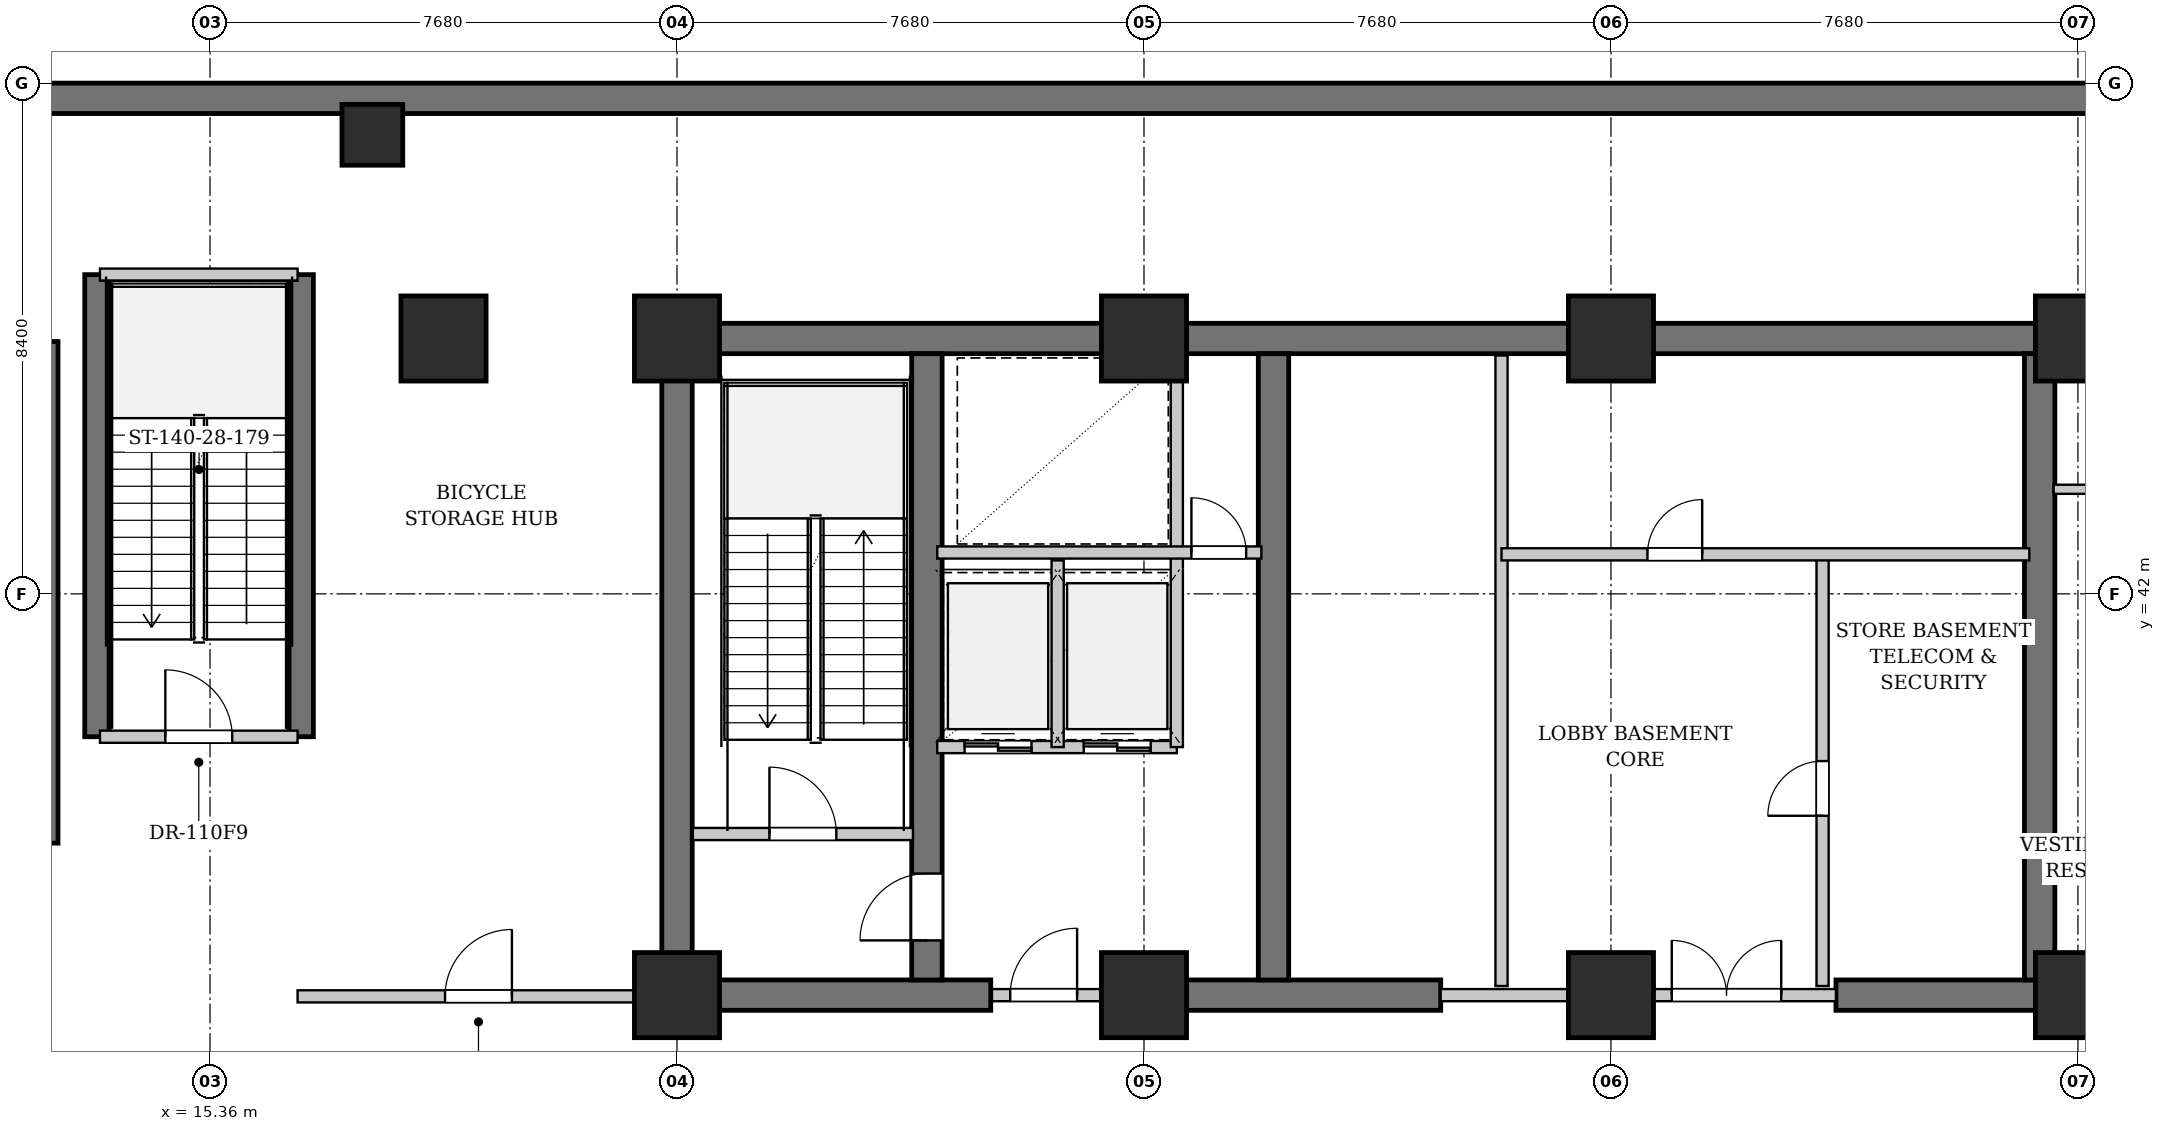
"""IFC4 building model, lengths in metres.
Left out: names, types, materials, properties, quantities, classifications, styles, units other than length and angle.
Written with IfcOpenShell. Run it as: python <this file> out.ifc"""

import sys

from ifc_helpers import new_model, si_unit, direction, frame, frame_2d, origin, origin_2d, place, context, subcontext, project, spatial, rectangle, extrude, element, fill, save


model = new_model("IFC4")
c1 = context("Model", 3, precision=1e-05, world=origin(), true_north=direction((0.0, 1.0)))
c2 = subcontext(c1, "Body", "Model", "MODEL_VIEW")
j1 = project(units=[si_unit("LENGTHUNIT", "METRE"), si_unit("PLANEANGLEUNIT", "RADIAN")], contexts=[c1])
p1 = place(None, origin())
s1 = spatial("IfcSite", under=j1, at=p1, CompositionType="ELEMENT")
p2 = place(p1, origin())
s2 = spatial("IfcBuilding", under=s1, at=p2, CompositionType="ELEMENT")
p3 = place(p2, frame((0.0, 0.0, -5.0)))
s3 = spatial("IfcBuildingStorey", under=s2, at=p3, CompositionType="ELEMENT", Elevation=-5.0)
p4 = place(p3, frame((0.0, 50.15, 0.0), z_axis=(0.0, 0.0, 1.0), x_axis=(1.0, 0.0, 0.0)))
e1 = element("IfcWall", 1, at=p4, inside=s3, PredefinedType="USERDEFINED", context=c2, shape_type="SweptSolid", body=[
    extrude(rectangle(XDim=76.8, YDim=0.5, at=frame_2d((38.4, 0.0))), origin(), (0.0, 0.0, 1.0), 4.65),
])
p5 = place(p3, frame((22.79, 46.2, 0.0), z_axis=(0.0, 0.0, 1.0), x_axis=(1.0, 0.0, 0.0)))
e2 = element("IfcWall", 2, at=p5, inside=s3, PredefinedType="SHEAR", context=c2, shape_type="SweptSolid", body=[
    extrude(rectangle(XDim=31.22, YDim=0.5, at=frame_2d((15.61, 0.0))), origin(), (0.0, 0.0, 1.0), 4.65),
])
p6 = place(p3, frame((22.79, 35.4, 0.0), z_axis=(0.0, 0.0, 1.0), x_axis=(1.0, 0.0, 0.0)))
e3 = element("IfcWall", 3, at=p6, inside=s3, PredefinedType="SHEAR", context=c2, shape_type="SweptSolid", body=[
    extrude(rectangle(XDim=5.41, YDim=0.5, at=frame_2d((2.705, 0.0))), origin(), (0.0, 0.0, 1.0), 4.65),
])
p7 = place(p3, frame((30.72, 35.4, 0.0), z_axis=(0.0, 0.0, 1.0), x_axis=(1.0, 0.0, 0.0)))
e4 = element("IfcWall", 4, at=p7, inside=s3, PredefinedType="SHEAR", context=c2, shape_type="SweptSolid", body=[
    extrude(rectangle(XDim=4.88, YDim=0.5, at=frame_2d((2.44, 0.0))), origin(), (0.0, 0.0, 1.0), 4.65),
])
p8 = place(p3, frame((42.1, 35.4, 0.0), z_axis=(0.0, 0.0, 1.0), x_axis=(1.0, 0.0, 0.0)))
e5 = element("IfcWall", 5, at=p8, inside=s3, PredefinedType="SHEAR", context=c2, shape_type="SweptSolid", body=[
    extrude(rectangle(XDim=8.05, YDim=0.5, at=frame_2d((4.025, 0.0))), origin(), (0.0, 0.0, 1.0), 4.65),
])
p9 = place(p8, frame((4.85, 0.0, 0.0)))
e6 = element("IfcOpeningElement", 6, at=p9, cuts=e5, PredefinedType="OPENING", context=c2, shape_type="SweptSolid", body=[
    extrude(rectangle(XDim=0.9, YDim=2.15, at=frame_2d((0.45, 1.075))), frame((0.0, 0.26, 0.0), z_axis=(0.0, -1.0, 0.0), x_axis=(1.0, 0.0, 0.0)), (0.0, 0.0, 1.0), 0.52),
])
p10 = place(p3, frame((23.04, 35.65, 0.0), z_axis=(0.0, 0.0, 1.0), x_axis=(0.0, 1.0, 0.0)))
e7 = element("IfcWall", 7, at=p10, inside=s3, PredefinedType="SHEAR", context=c2, shape_type="SweptSolid", body=[
    extrude(rectangle(XDim=10.3, YDim=0.5, at=frame_2d((5.15, 0.0))), origin(), (0.0, 0.0, 1.0), 4.65),
])
p11 = place(p3, frame((27.15, 35.65, 0.0), z_axis=(0.0, 0.0, 1.0), x_axis=(0.0, 1.0, 0.0)))
e8 = element("IfcWall", 8, at=p11, inside=s3, PredefinedType="SHEAR", context=c2, shape_type="SweptSolid", body=[
    extrude(rectangle(XDim=10.3, YDim=0.5, at=frame_2d((5.15, 0.0))), origin(), (0.0, 0.0, 1.0), 4.65),
])
p12 = place(p11, frame((0.65, 0.0, 0.0)))
e9 = element("IfcOpeningElement", 9, at=p12, cuts=e8, PredefinedType="OPENING", context=c2, shape_type="SweptSolid", body=[
    extrude(rectangle(XDim=1.1, YDim=2.15, at=frame_2d((0.55, 1.075))), frame((0.0, 0.26, 0.0), z_axis=(0.0, -1.0, 0.0), x_axis=(1.0, 0.0, 0.0)), (0.0, 0.0, 1.0), 0.52),
])
for number, where, z_axis, x_axis in (
    (10, (32.85, 35.65, 0.0), (0.0, 0.0, 1.0), (0.0, 1.0, 0.0)),
    (11, (45.45, 35.65, 0.0), (0.0, 0.0, 1.0), (0.0, 1.0, 0.0)),
):
    element("IfcWall", number, at=place(p3, frame(where, z_axis=z_axis, x_axis=x_axis)), inside=s3, PredefinedType="SHEAR", context=c2, shape_type="SweptSolid", body=[
        extrude(rectangle(XDim=10.3, YDim=0.5, at=frame_2d((5.15, 0.0))), origin(), (0.0, 0.0, 1.0), 4.65),
    ])
p13 = place(p3, frame((12.66, 37.9, 0.0), z_axis=(0.0, 0.0, 1.0), x_axis=(0.0, 1.0, 0.0)))
e12 = element("IfcWall", 12, at=p13, inside=s3, PredefinedType="SHEAR", context=c2, shape_type="SweptSolid", body=[
    extrude(rectangle(XDim=8.25, YDim=0.4, at=frame_2d((4.125, 0.0))), origin(), (0.0, 0.0, 1.0), 4.65),
])
for number, where, z_axis, x_axis in (
    (13, (13.5, 39.65, 0.0), (0.0, 0.0, 1.0), (0.0, 1.0, 0.0)),
    (14, (16.86, 39.65, 0.0), (0.0, 0.0, 1.0), (0.0, 1.0, 0.0)),
):
    element("IfcWall", number, at=place(p3, frame(where, z_axis=z_axis, x_axis=x_axis)), inside=s3, PredefinedType="SHEAR", context=c2, shape_type="SweptSolid", body=[
        extrude(rectangle(XDim=7.6, YDim=0.4, at=frame_2d((3.8, 0.0))), origin(), (0.0, 0.0, 1.0), 4.65),
    ])
for number, where, z_axis, x_axis in (
    (15, (23.04, 35.4, 0.0), (0.0, 0.0, 1.0), (1.0, 0.0, 0.0)),
    (16, (23.04, 46.2, 0.0), (0.0, 0.0, 1.0), (1.0, 0.0, 0.0)),
    (17, (30.72, 35.4, 0.0), (0.0, 0.0, 1.0), (1.0, 0.0, 0.0)),
    (18, (30.72, 46.2, 0.0), (0.0, 0.0, 1.0), (1.0, 0.0, 0.0)),
    (19, (38.4, 35.4, 0.0), (0.0, 0.0, 1.0), (1.0, 0.0, 0.0)),
    (20, (38.4, 46.2, 0.0), (0.0, 0.0, 1.0), (1.0, 0.0, 0.0)),
    (21, (46.08, 35.4, 0.0), (0.0, 0.0, 1.0), (1.0, 0.0, 0.0)),
    (22, (46.08, 46.2, 0.0), (0.0, 0.0, 1.0), (1.0, 0.0, 0.0)),
    (23, (19.2, 46.2, 0.0), (0.0, 0.0, 1.0), (1.0, 0.0, 0.0)),
):
    element("IfcColumn", number, at=place(p3, frame(where, z_axis=z_axis, x_axis=x_axis)), inside=s3, PredefinedType="COLUMN", context=c2, shape_type="SweptSolid", body=[
        extrude(rectangle(XDim=1.4, YDim=1.4, at=origin_2d()), origin(), (0.0, 0.0, 1.0), 5.0),
    ])
p14 = place(p3, frame((18.03, 49.55, 0.0), z_axis=(0.0, 0.0, 1.0), x_axis=(1.0, 0.0, 0.0)))
e24 = element("IfcColumn", 24, at=p14, inside=s3, PredefinedType="COLUMN", context=c2, shape_type="SweptSolid", body=[
    extrude(rectangle(XDim=1.0, YDim=1.0, at=origin_2d()), origin(), (0.0, 0.0, 1.0), 5.0),
])
p15 = place(p3, frame((23.3, 38.05, 0.0), z_axis=(0.0, 0.0, 1.0), x_axis=(1.0, 0.0, 0.0)))
e25 = element("IfcWall", 25, at=p15, inside=s3, PredefinedType="PARTITIONING", context=c2, shape_type="SweptSolid", body=[
    extrude(rectangle(XDim=3.62, YDim=0.2, at=frame_2d((1.81, 0.0))), origin(), (0.0, 0.0, 1.0), 4.65),
])
p16 = place(p15, frame((1.26, 0.0, 0.0)))
e26 = element("IfcOpeningElement", 26, at=p16, cuts=e25, PredefinedType="OPENING", context=c2, shape_type="SweptSolid", body=[
    extrude(rectangle(XDim=1.1, YDim=2.15, at=frame_2d((0.55, 1.075))), frame((0.0, 0.11, 0.0), z_axis=(0.0, -1.0, 0.0), x_axis=(1.0, 0.0, 0.0)), (0.0, 0.0, 1.0), 0.22),
])
p17 = place(p3, frame((28.22, 35.4, 0.0), z_axis=(0.0, 0.0, 1.0), x_axis=(1.0, 0.0, 0.0)))
e27 = element("IfcWall", 27, at=p17, inside=s3, PredefinedType="PARTITIONING", context=c2, shape_type="SweptSolid", body=[
    extrude(rectangle(XDim=2.5, YDim=0.2, at=frame_2d((1.25, 0.0))), origin(), (0.0, 0.0, 1.0), 3.845),
])
p18 = place(p17, frame((0.3, 0.0, 0.0)))
e28 = element("IfcOpeningElement", 28, at=p18, cuts=e27, PredefinedType="OPENING", context=c2, shape_type="SweptSolid", body=[
    extrude(rectangle(XDim=1.1, YDim=2.15, at=frame_2d((0.55, 1.075))), frame((0.0, 0.11, 0.0), z_axis=(0.0, -1.0, 0.0), x_axis=(1.0, 0.0, 0.0)), (0.0, 0.0, 1.0), 0.22),
])
p19 = place(p3, frame((27.32, 39.48, 0.0), z_axis=(0.0, 0.0, 1.0), x_axis=(1.0, 0.0, 0.0)))
e29 = element("IfcWall", 29, at=p19, inside=s3, PredefinedType="PARTITIONING", context=c2, shape_type="SweptSolid", body=[
    extrude(rectangle(XDim=3.94, YDim=0.2, at=frame_2d((1.97, 0.0))), origin(), (0.0, 0.0, 1.0), 4.65),
])
p20 = place(p19, frame((0.45, 0.0, 0.0)))
e30 = element("IfcOpeningElement", 30, at=p20, cuts=e29, PredefinedType="OPENING", context=c2, shape_type="SweptSolid", body=[
    extrude(rectangle(XDim=1.1, YDim=2.2, at=frame_2d((0.55, 1.1))), frame((0.0, 0.11, 0.0), z_axis=(0.0, -1.0, 0.0), x_axis=(1.0, 0.0, 0.0)), (0.0, 0.0, 1.0), 0.22),
])
p21 = place(p19, frame((2.41, 0.0, 0.0)))
e31 = element("IfcOpeningElement", 31, at=p21, cuts=e29, PredefinedType="OPENING", context=c2, shape_type="SweptSolid", body=[
    extrude(rectangle(XDim=1.1, YDim=2.2, at=frame_2d((0.55, 1.1))), frame((0.0, 0.11, 0.0), z_axis=(0.0, -1.0, 0.0), x_axis=(1.0, 0.0, 0.0)), (0.0, 0.0, 1.0), 0.22),
])
p22 = place(p3, frame((29.3, 39.48, 0.0), z_axis=(0.0, 0.0, 1.0), x_axis=(0.0, 1.0, 0.0)))
e32 = element("IfcWall", 32, at=p22, inside=s3, PredefinedType="PARTITIONING", context=c2, shape_type="SweptSolid", body=[
    extrude(rectangle(XDim=3.07, YDim=0.2, at=frame_2d((1.535, 0.0))), origin(), (0.0, 0.0, 1.0), 4.65),
])
p23 = place(p3, frame((31.26, 39.48, 0.0), z_axis=(0.0, 0.0, 1.0), x_axis=(0.0, 1.0, 0.0)))
e33 = element("IfcWall", 33, at=p23, inside=s3, PredefinedType="PARTITIONING", context=c2, shape_type="SweptSolid", body=[
    extrude(rectangle(XDim=6.44, YDim=0.2, at=frame_2d((3.22, 0.0))), origin(), (0.0, 0.0, 1.0), 4.65),
])
p24 = place(p3, frame((27.32, 42.68, 0.0), z_axis=(0.0, 0.0, 1.0), x_axis=(1.0, 0.0, 0.0)))
e34 = element("IfcWall", 34, at=p24, inside=s3, PredefinedType="PARTITIONING", context=c2, shape_type="SweptSolid", body=[
    extrude(rectangle(XDim=5.33, YDim=0.2, at=frame_2d((2.665, 0.0))), origin(), (0.0, 0.0, 1.0), 4.65),
])
p25 = place(p24, frame((4.18, 0.0, 0.0)))
e35 = element("IfcOpeningElement", 35, at=p25, cuts=e34, PredefinedType="OPENING", context=c2, shape_type="SweptSolid", body=[
    extrude(rectangle(XDim=0.9, YDim=2.15, at=frame_2d((0.45, 1.075))), frame((0.0, 0.11, 0.0), z_axis=(0.0, -1.0, 0.0), x_axis=(1.0, 0.0, 0.0)), (0.0, 0.0, 1.0), 0.22),
])
p26 = place(p3, frame((35.6, 35.4, 0.0), z_axis=(0.0, 0.0, 1.0), x_axis=(1.0, 0.0, 0.0)))
e36 = element("IfcWall", 36, at=p26, inside=s3, PredefinedType="PARTITIONING", context=c2, shape_type="SweptSolid", body=[
    extrude(rectangle(XDim=6.5, YDim=0.2, at=frame_2d((3.25, 0.0))), origin(), (0.0, 0.0, 1.0), 3.845),
])
p27 = place(p26, frame((3.8, 0.0, 0.0)))
e37 = element("IfcOpeningElement", 37, at=p27, cuts=e36, PredefinedType="OPENING", context=c2, shape_type="SweptSolid", body=[
    extrude(rectangle(XDim=1.8, YDim=2.3, at=frame_2d((0.9, 1.15))), frame((0.0, 0.11, 0.0), z_axis=(0.0, -1.0, 0.0), x_axis=(1.0, 0.0, 0.0)), (0.0, 0.0, 1.0), 0.22),
])
p28 = place(p3, frame((36.6, 35.55, 0.0), z_axis=(0.0, 0.0, 1.0), x_axis=(0.0, 1.0, 0.0)))
e38 = element("IfcWall", 38, at=p28, inside=s3, PredefinedType="PARTITIONING", context=c2, shape_type="SweptSolid", body=[
    extrude(rectangle(XDim=10.37, YDim=0.2, at=frame_2d((5.185, 0.0))), origin(), (0.0, 0.0, 1.0), 4.65),
])
p29 = place(p3, frame((41.88, 35.55, 0.0), z_axis=(0.0, 0.0, 1.0), x_axis=(0.0, 1.0, 0.0)))
e39 = element("IfcWall", 39, at=p29, inside=s3, PredefinedType="PARTITIONING", context=c2, shape_type="SweptSolid", body=[
    extrude(rectangle(XDim=7.1, YDim=0.2, at=frame_2d((3.55, 0.0))), origin(), (0.0, 0.0, 1.0), 4.65),
])
p30 = place(p29, frame((2.8, 0.0, 0.0)))
e40 = element("IfcOpeningElement", 40, at=p30, cuts=e39, PredefinedType="OPENING", context=c2, shape_type="SweptSolid", body=[
    extrude(rectangle(XDim=0.9, YDim=2.15, at=frame_2d((0.45, 1.075))), frame((0.0, 0.11, 0.0), z_axis=(0.0, -1.0, 0.0), x_axis=(1.0, 0.0, 0.0)), (0.0, 0.0, 1.0), 0.22),
])
p31 = place(p3, frame((36.6, 42.65, 0.0), z_axis=(0.0, 0.0, 1.0), x_axis=(1.0, 0.0, 0.0)))
e41 = element("IfcWall", 41, at=p31, inside=s3, PredefinedType="PARTITIONING", context=c2, shape_type="SweptSolid", body=[
    extrude(rectangle(XDim=8.68, YDim=0.2, at=frame_2d((4.34, 0.0))), origin(), (0.0, 0.0, 1.0), 4.65),
])
p32 = place(p31, frame((2.4, 0.0, 0.0)))
e42 = element("IfcOpeningElement", 42, at=p32, cuts=e41, PredefinedType="OPENING", context=c2, shape_type="SweptSolid", body=[
    extrude(rectangle(XDim=0.9, YDim=2.15, at=frame_2d((0.45, 1.075))), frame((0.0, 0.11, 0.0), z_axis=(0.0, -1.0, 0.0), x_axis=(1.0, 0.0, 0.0)), (0.0, 0.0, 1.0), 0.22),
])
p33 = place(p3, frame((45.68, 43.72, 0.0), z_axis=(0.0, 0.0, 1.0), x_axis=(1.0, 0.0, 0.0)))
e43 = element("IfcWall", 43, at=p33, inside=s3, PredefinedType="PARTITIONING", context=c2, shape_type="SweptSolid", body=[
    extrude(rectangle(XDim=4.5, YDim=0.15, at=frame_2d((2.25, 0.0))), origin(), (0.0, 0.0, 1.0), 4.65),
])
p34 = place(p33, frame((0.55, 0.0, 0.0)))
e44 = element("IfcOpeningElement", 44, at=p34, cuts=e43, PredefinedType="OPENING", context=c2, shape_type="SweptSolid", body=[
    extrude(rectangle(XDim=0.95, YDim=2.15, at=frame_2d((0.475, 1.075))), frame((0.0, 0.085, 0.0), z_axis=(0.0, -1.0, 0.0), x_axis=(1.0, 0.0, 0.0)), (0.0, 0.0, 1.0), 0.17),
])
p35 = place(p3, frame((13.55, 47.25, 0.0), z_axis=(0.0, 0.0, 1.0), x_axis=(1.0, 0.0, 0.0)))
e45 = element("IfcWall", 45, at=p35, inside=s3, PredefinedType="PARTITIONING", context=c2, shape_type="SweptSolid", body=[
    extrude(rectangle(XDim=3.25, YDim=0.2, at=frame_2d((1.625, 0.0))), origin(), (0.0, 0.0, 1.0), 4.65),
])
p36 = place(p3, frame((13.55, 39.65, 0.0), z_axis=(0.0, 0.0, 1.0), x_axis=(1.0, 0.0, 0.0)))
e46 = element("IfcWall", 46, at=p36, inside=s3, PredefinedType="PARTITIONING", context=c2, shape_type="SweptSolid", body=[
    extrude(rectangle(XDim=3.25, YDim=0.2, at=frame_2d((1.625, 0.0))), origin(), (0.0, 0.0, 1.0), 4.65),
])
p37 = place(p36, frame((1.075, 0.0, 0.0)))
e47 = element("IfcOpeningElement", 47, at=p37, cuts=e46, PredefinedType="OPENING", context=c2, shape_type="SweptSolid", body=[
    extrude(rectangle(XDim=1.1, YDim=2.15, at=frame_2d((0.55, 1.075))), frame((0.0, 0.11, 0.0), z_axis=(0.0, -1.0, 0.0), x_axis=(1.0, 0.0, 0.0)), (0.0, 0.0, 1.0), 0.22),
])
p38 = place(p3, frame((16.8, 35.38, 0.0), z_axis=(0.0, 0.0, 1.0), x_axis=(1.0, 0.0, 0.0)))
e48 = element("IfcWall", 48, at=p38, inside=s3, PredefinedType="PARTITIONING", context=c2, shape_type="SweptSolid", body=[
    extrude(rectangle(XDim=5.95, YDim=0.2, at=frame_2d((2.975, 0.0))), origin(), (0.0, 0.0, 1.0), 4.65),
])
p39 = place(p38, frame((2.425, 0.0, 0.0)))
e49 = element("IfcOpeningElement", 49, at=p39, cuts=e48, PredefinedType="OPENING", context=c2, shape_type="SweptSolid", body=[
    extrude(rectangle(XDim=1.1, YDim=2.15, at=frame_2d((0.55, 1.075))), frame((0.0, 0.11, 0.0), z_axis=(0.0, -1.0, 0.0), x_axis=(1.0, 0.0, 0.0)), (0.0, 0.0, 1.0), 0.22),
])
p40 = place(p16, origin())
e50 = element("IfcDoor", 50, at=p40, inside=s3, OperationType="SINGLE_SWING_LEFT", PredefinedType="DOOR", context=c2, shape_type="SweptSolid", body=[
    extrude(rectangle(XDim=1.1, YDim=2.15, at=frame_2d((0.55, 1.075))), frame((0.0, 0.025, 0.0), z_axis=(0.0, -1.0, 0.0), x_axis=(1.0, 0.0, 0.0)), (0.0, 0.0, 1.0), 0.05),
])
fill(e26, e50)
p41 = place(p18, origin())
e51 = element("IfcDoor", 51, at=p41, inside=s3, OperationType="SINGLE_SWING_RIGHT", PredefinedType="DOOR", context=c2, shape_type="SweptSolid", body=[
    extrude(rectangle(XDim=1.1, YDim=2.15, at=frame_2d((0.55, 1.075))), frame((0.0, 0.025, 0.0), z_axis=(0.0, -1.0, 0.0), x_axis=(1.0, 0.0, 0.0)), (0.0, 0.0, 1.0), 0.05),
])
fill(e28, e51)
p42 = place(p20, origin())
e52 = element("IfcDoor", 52, at=p42, inside=s3, OperationType="DOUBLE_DOOR_SLIDING", PredefinedType="DOOR", context=c2, shape_type="SweptSolid", body=[
    extrude(rectangle(XDim=1.1, YDim=2.2, at=frame_2d((0.55, 1.1))), frame((0.0, 0.025, 0.0), z_axis=(0.0, -1.0, 0.0), x_axis=(1.0, 0.0, 0.0)), (0.0, 0.0, 1.0), 0.05),
])
fill(e30, e52)
p43 = place(p21, origin())
e53 = element("IfcDoor", 53, at=p43, inside=s3, OperationType="DOUBLE_DOOR_SLIDING", PredefinedType="DOOR", context=c2, shape_type="SweptSolid", body=[
    extrude(rectangle(XDim=1.1, YDim=2.2, at=frame_2d((0.55, 1.1))), frame((0.0, 0.025, 0.0), z_axis=(0.0, -1.0, 0.0), x_axis=(1.0, 0.0, 0.0)), (0.0, 0.0, 1.0), 0.05),
])
fill(e31, e53)
p44 = place(p25, origin())
e54 = element("IfcDoor", 54, at=p44, inside=s3, OperationType="SINGLE_SWING_LEFT", PredefinedType="DOOR", context=c2, shape_type="SweptSolid", body=[
    extrude(rectangle(XDim=0.9, YDim=2.15, at=frame_2d((0.45, 1.075))), frame((0.0, 0.025, 0.0), z_axis=(0.0, -1.0, 0.0), x_axis=(1.0, 0.0, 0.0)), (0.0, 0.0, 1.0), 0.05),
])
fill(e35, e54)
p45 = place(p27, origin())
e55 = element("IfcDoor", 55, at=p45, inside=s3, OperationType="DOUBLE_DOOR_SINGLE_SWING", PredefinedType="DOOR", context=c2, shape_type="SweptSolid", body=[
    extrude(rectangle(XDim=1.8, YDim=2.3, at=frame_2d((0.9, 1.15))), frame((0.0, 0.025, 0.0), z_axis=(0.0, -1.0, 0.0), x_axis=(1.0, 0.0, 0.0)), (0.0, 0.0, 1.0), 0.05),
])
fill(e37, e55)
p46 = place(p30, origin())
e56 = element("IfcDoor", 56, at=p46, inside=s3, OperationType="SINGLE_SWING_LEFT", PredefinedType="DOOR", context=c2, shape_type="SweptSolid", body=[
    extrude(rectangle(XDim=0.9, YDim=2.15, at=frame_2d((0.45, 1.075))), frame((0.0, 0.025, 0.0), z_axis=(0.0, -1.0, 0.0), x_axis=(1.0, 0.0, 0.0)), (0.0, 0.0, 1.0), 0.05),
])
fill(e40, e56)
p47 = place(p32, origin())
e57 = element("IfcDoor", 57, at=p47, inside=s3, OperationType="SINGLE_SWING_RIGHT", PredefinedType="DOOR", context=c2, shape_type="SweptSolid", body=[
    extrude(rectangle(XDim=0.9, YDim=2.15, at=frame_2d((0.45, 1.075))), frame((0.0, 0.025, 0.0), z_axis=(0.0, -1.0, 0.0), x_axis=(1.0, 0.0, 0.0)), (0.0, 0.0, 1.0), 0.05),
])
fill(e42, e57)
p48 = place(p37, origin())
e58 = element("IfcDoor", 58, at=p48, inside=s3, OperationType="SINGLE_SWING_LEFT", PredefinedType="DOOR", context=c2, shape_type="SweptSolid", body=[
    extrude(rectangle(XDim=1.1, YDim=2.15, at=frame_2d((0.55, 1.075))), frame((0.0, 0.025, 0.0), z_axis=(0.0, -1.0, 0.0), x_axis=(1.0, 0.0, 0.0)), (0.0, 0.0, 1.0), 0.05),
])
fill(e47, e58)
p49 = place(p39, origin())
e59 = element("IfcDoor", 59, at=p49, inside=s3, OperationType="SINGLE_SWING_RIGHT", PredefinedType="DOOR", context=c2, shape_type="SweptSolid", body=[
    extrude(rectangle(XDim=1.1, YDim=2.15, at=frame_2d((0.55, 1.075))), frame((0.0, 0.025, 0.0), z_axis=(0.0, -1.0, 0.0), x_axis=(1.0, 0.0, 0.0)), (0.0, 0.0, 1.0), 0.05),
])
fill(e49, e59)
p50 = place(p12, origin())
e60 = element("IfcDoor", 60, at=p50, inside=s3, OperationType="SINGLE_SWING_LEFT", PredefinedType="DOOR", context=c2, shape_type="SweptSolid", body=[
    extrude(rectangle(XDim=1.1, YDim=2.15, at=frame_2d((0.55, 1.075))), frame((0.0, 0.025, 0.0), z_axis=(0.0, -1.0, 0.0), x_axis=(1.0, 0.0, 0.0)), (0.0, 0.0, 1.0), 0.05),
])
fill(e9, e60)
save(model, sys.argv[1])
